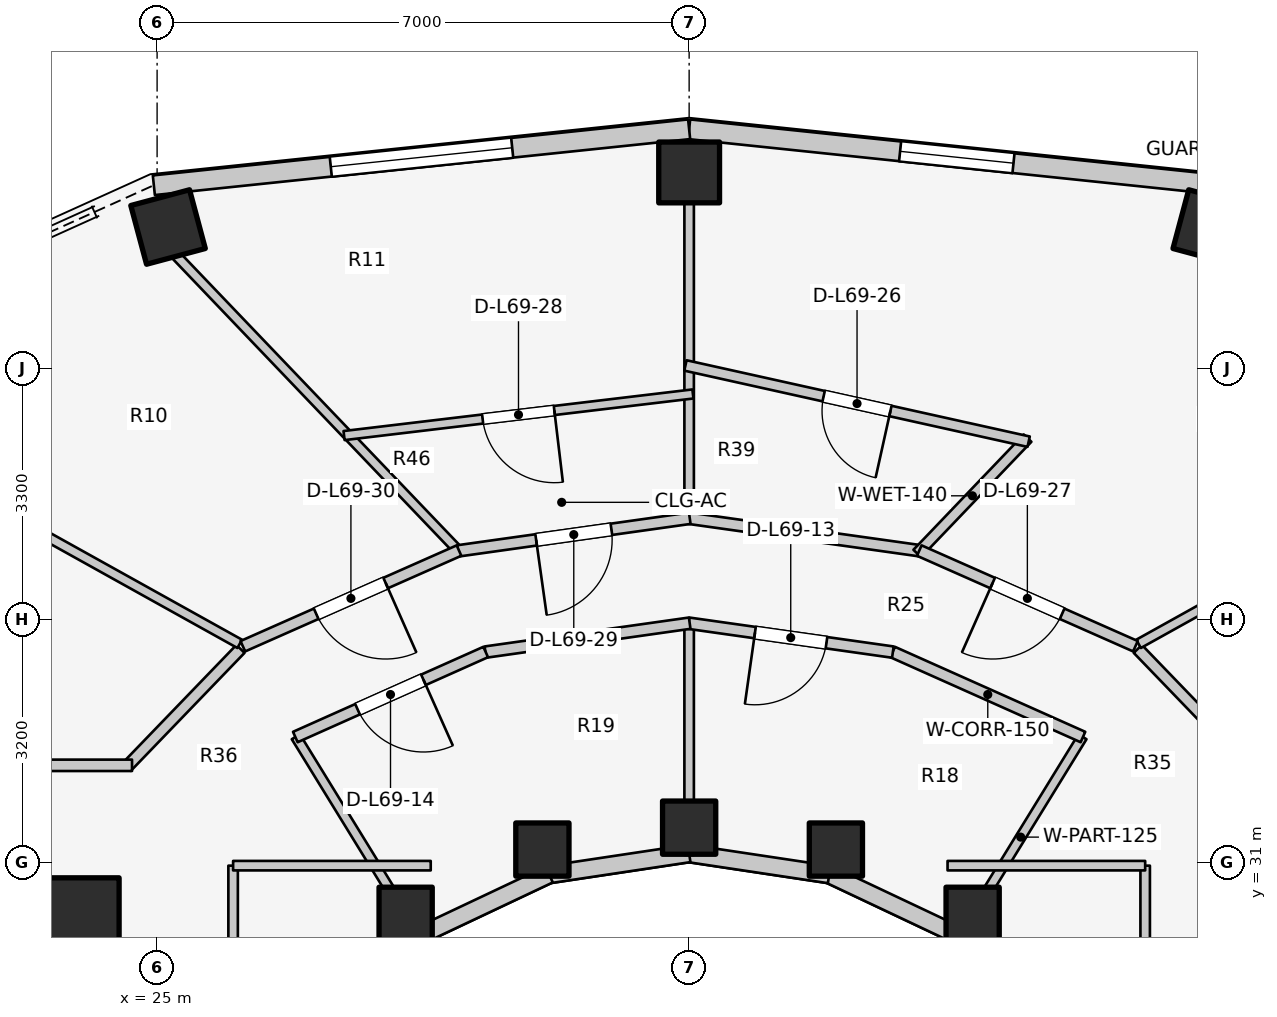
"""IFC4 building model, lengths in metres.
Left out: names, types, materials, properties, quantities, classifications, styles, units other than length and angle.
Written with IfcOpenShell. Run it as: python <this file> out.ifc"""

import sys

from ifc_helpers import new_model, si_unit, direction, frame, frame_2d, origin, origin_2d, place, context, subcontext, project, spatial, rectangle, extrude, element, fill, save


model = new_model("IFC4")
c1 = context("Model", 3, precision=1e-05, world=origin(), true_north=direction((0.0, 1.0)))
c2 = subcontext(c1, "Body", "Model", "MODEL_VIEW")
j1 = project(units=[si_unit("LENGTHUNIT", "METRE"), si_unit("PLANEANGLEUNIT", "RADIAN")], contexts=[c1])
p1 = place(None, origin())
s1 = spatial("IfcSite", under=j1, at=p1, CompositionType="ELEMENT")
p2 = place(p1, origin())
s2 = spatial("IfcBuilding", under=s1, at=p2, CompositionType="ELEMENT")
p3 = place(p2, frame((0.0, 0.0, 226.4)))
s3 = spatial("IfcBuildingStorey", under=s2, at=p3, CompositionType="ELEMENT", Elevation=226.4)
p4 = place(p3, frame((19.65, 30.35, 0.0), z_axis=(0.0, 0.0, 1.0), x_axis=(1.0, 0.0, 0.0)))
e1 = element("IfcWall", 1, at=p4, inside=s3, PredefinedType="SHEAR", context=c2, shape_type="SweptSolid", body=[
    extrude(rectangle(XDim=4.5, YDim=0.55, at=frame_2d((2.25, 0.0))), origin(), (0.0, 0.0, 1.0), 3.1),
])
p5 = place(p3, frame((23.9, 30.2, 0.0), z_axis=(0.0, 0.0, 1.0), x_axis=(1.0, 0.0, 0.0)))
e2 = element("IfcColumn", 2, at=p5, inside=s3, PredefinedType="COLUMN", context=c2, shape_type="SweptSolid", body=[
    extrude(rectangle(XDim=1.2, YDim=1.2, at=origin_2d()), origin(), (0.0, 0.0, 1.0), 3.1),
])
for number, where, z_axis, x_axis in (
    (3, (35.73, 30.327, 0.0), (0.0, 0.0, 1.0), (1.0, 0.0, 0.0)),
    (4, (33.931, 31.172, 0.0), (0.0, 0.0, 1.0), (1.0, 0.0, 0.0)),
):
    element("IfcColumn", number, at=place(p3, frame(where, z_axis=z_axis, x_axis=x_axis)), inside=s3, PredefinedType="COLUMN", context=c2, shape_type="SweptSolid", body=[
        extrude(rectangle(XDim=0.7, YDim=0.7, at=origin_2d()), origin(), (0.0, 0.0, 1.0), 3.1),
    ])
p6 = place(p3, frame((38.856, 39.362, 0.0), z_axis=(0.0, 0.0, 1.0), x_axis=(0.258819045103, 0.965925826289, 0.0)))
e5 = element("IfcColumn", 5, at=p6, inside=s3, PredefinedType="COLUMN", context=c2, shape_type="SweptSolid", body=[
    extrude(rectangle(XDim=0.8, YDim=0.8, at=origin_2d()), origin(), (0.0, 0.0, 1.0), 3.1),
])
p7 = place(p3, frame((32.0, 31.46, 0.0), z_axis=(0.0, 0.0, 1.0), x_axis=(1.0, 0.0, 0.0)))
e6 = element("IfcColumn", 6, at=p7, inside=s3, PredefinedType="COLUMN", context=c2, shape_type="SweptSolid", body=[
    extrude(rectangle(XDim=0.7, YDim=0.7, at=origin_2d()), origin(), (0.0, 0.0, 1.0), 3.1),
])
p8 = place(p3, frame((32.0, 40.08, 0.0), z_axis=(0.0, 0.0, 1.0), x_axis=(0.0, 1.0, 0.0)))
e7 = element("IfcColumn", 7, at=p8, inside=s3, PredefinedType="COLUMN", context=c2, shape_type="SweptSolid", body=[
    extrude(rectangle(XDim=0.8, YDim=0.8, at=origin_2d()), origin(), (0.0, 0.0, 1.0), 3.1),
])
p9 = place(p3, frame((30.069, 31.172, 0.0), z_axis=(0.0, 0.0, 1.0), x_axis=(1.0, 0.0, 0.0)))
e8 = element("IfcColumn", 8, at=p9, inside=s3, PredefinedType="COLUMN", context=c2, shape_type="SweptSolid", body=[
    extrude(rectangle(XDim=0.7, YDim=0.7, at=origin_2d()), origin(), (0.0, 0.0, 1.0), 3.1),
])
p10 = place(p3, frame((25.144, 39.362, 0.0), z_axis=(0.0, 0.0, 1.0), x_axis=(-0.258819045103, 0.965925826289, 0.0)))
e9 = element("IfcColumn", 9, at=p10, inside=s3, PredefinedType="COLUMN", context=c2, shape_type="SweptSolid", body=[
    extrude(rectangle(XDim=0.8, YDim=0.8, at=origin_2d()), origin(), (0.0, 0.0, 1.0), 3.1),
])
p11 = place(p3, frame((28.27, 30.327, 0.0), z_axis=(0.0, 0.0, 1.0), x_axis=(1.0, 0.0, 0.0)))
e10 = element("IfcColumn", 10, at=p11, inside=s3, PredefinedType="COLUMN", context=c2, shape_type="SweptSolid", body=[
    extrude(rectangle(XDim=0.7, YDim=0.7, at=origin_2d()), origin(), (0.0, 0.0, 1.0), 3.1),
])
p12 = place(p3, frame((37.035, 28.742, 0.0), z_axis=(0.0, 0.0, 1.0), x_axis=(-0.752576694707, 0.658504607869, 0.0)))
e11 = element("IfcWall", 11, at=p12, inside=s3, PredefinedType="STANDARD", context=c2, shape_type="SweptSolid", body=[
    extrude(rectangle(XDim=1.959, YDim=0.23, at=frame_2d((0.98, 0.0))), origin(), (0.0, 0.0, 1.0), 2.16),
])
p13 = place(p3, frame((35.56, 30.032, 0.0), z_axis=(0.0, 0.0, 1.0), x_axis=(-0.904179699603, 0.427152280606, 0.0)))
e12 = element("IfcWall", 12, at=p13, inside=s3, PredefinedType="STANDARD", context=c2, shape_type="SweptSolid", body=[
    extrude(rectangle(XDim=1.899, YDim=0.23, at=frame_2d((0.95, 0.0))), origin(), (0.0, 0.0, 1.0), 2.16),
])
for number, where, z_axis, x_axis in (
    (13, (33.843, 30.843, 0.0), (0.0, 0.0, 1.0), (-0.989, 0.149, 0.0)),
    (14, (32.0, 31.12, 0.0), (0.0, 0.0, 1.0), (-0.989, -0.149, 0.0)),
):
    element("IfcWall", number, at=place(p3, frame(where, z_axis=z_axis, x_axis=x_axis)), inside=s3, PredefinedType="STANDARD", context=c2, shape_type="SweptSolid", body=[
        extrude(rectangle(XDim=1.864, YDim=0.23, at=frame_2d((0.932, 0.0))), origin(), (0.0, 0.0, 1.0), 2.16),
    ])
p14 = place(p3, frame((30.157, 30.843, 0.0), z_axis=(0.0, 0.0, 1.0), x_axis=(-0.904179699603, -0.427152280606, 0.0)))
e15 = element("IfcWall", 15, at=p14, inside=s3, PredefinedType="STANDARD", context=c2, shape_type="SweptSolid", body=[
    extrude(rectangle(XDim=1.899, YDim=0.23, at=frame_2d((0.95, 0.0))), origin(), (0.0, 0.0, 1.0), 2.16),
])
p15 = place(p3, frame((28.44, 30.032, 0.0), z_axis=(0.0, 0.0, 1.0), x_axis=(-0.752576694707, -0.658504607869, 0.0)))
e16 = element("IfcWall", 16, at=p15, inside=s3, PredefinedType="STANDARD", context=c2, shape_type="SweptSolid", body=[
    extrude(rectangle(XDim=1.959, YDim=0.23, at=frame_2d((0.98, 0.0))), origin(), (0.0, 0.0, 1.0), 2.16),
])
p16 = place(p3, frame((39.043, 39.912, 0.0), z_axis=(0.0, 0.0, 1.0), x_axis=(-0.994582822721, 0.103947144014, 0.0)))
e17 = element("IfcWall", 17, at=p16, inside=s3, PredefinedType="STANDARD", context=c2, shape_type="SweptSolid", body=[
    extrude(rectangle(XDim=7.081, YDim=0.26, at=frame_2d((3.541, 0.0))), origin(), (0.0, 0.0, 1.0), 2.85),
])
p17 = place(p16, frame((2.791, 0.0, 0.75)))
e18 = element("IfcOpeningElement", 18, at=p17, cuts=e17, PredefinedType="OPENING", context=c2, shape_type="SweptSolid", body=[
    extrude(rectangle(XDim=1.5, YDim=1.6, at=frame_2d((0.75, 0.8))), frame((0.0, 0.14, 0.0), z_axis=(0.0, -1.0, 0.0), x_axis=(1.0, 0.0, 0.0)), (0.0, 0.0, 1.0), 0.28),
])
p18 = place(p3, frame((32.0, 40.648, 0.0), z_axis=(0.0, 0.0, 1.0), x_axis=(-0.994582822721, -0.103947144014, 0.0)))
e19 = element("IfcWall", 19, at=p18, inside=s3, PredefinedType="STANDARD", context=c2, shape_type="SweptSolid", body=[
    extrude(rectangle(XDim=7.081, YDim=0.26, at=frame_2d((3.541, 0.0))), origin(), (0.0, 0.0, 1.0), 2.85),
])
p19 = place(p18, frame((2.341, 0.0, 0.75)))
e20 = element("IfcOpeningElement", 20, at=p19, cuts=e19, PredefinedType="OPENING", context=c2, shape_type="SweptSolid", body=[
    extrude(rectangle(XDim=2.4, YDim=1.7, at=frame_2d((1.2, 0.85))), frame((0.0, 0.14, 0.0), z_axis=(0.0, -1.0, 0.0), x_axis=(1.0, 0.0, 0.0)), (0.0, 0.0, 1.0), 0.28),
])
p20 = place(p3, frame((35.55, 30.015, 0.0), z_axis=(0.0, 0.0, 1.0), x_axis=(0.523992004803, 0.851723182086, 0.0)))
e21 = element("IfcWall", 21, at=p20, inside=s3, PredefinedType="PARTITIONING", context=c2, shape_type="SweptSolid", body=[
    extrude(rectangle(XDim=3.101, YDim=0.125, at=frame_2d((1.551, 0.0))), origin(), (0.0, 0.0, 1.0), 2.376),
])
p21 = place(p3, frame((32.0, 31.1, 0.0), z_axis=(0.0, 0.0, 1.0), x_axis=(0.0, 1.0, 0.0)))
e22 = element("IfcWall", 22, at=p21, inside=s3, PredefinedType="PARTITIONING", context=c2, shape_type="SweptSolid", body=[
    extrude(rectangle(XDim=3.05, YDim=0.125, at=frame_2d((1.525, 0.0))), origin(), (0.0, 0.0, 1.0), 2.376),
])
p22 = place(p3, frame((28.45, 30.015, 0.0), z_axis=(0.0, 0.0, 1.0), x_axis=(-0.523992004803, 0.851723182086, 0.0)))
e23 = element("IfcWall", 23, at=p22, inside=s3, PredefinedType="PARTITIONING", context=c2, shape_type="SweptSolid", body=[
    extrude(rectangle(XDim=3.101, YDim=0.125, at=frame_2d((1.551, 0.0))), origin(), (0.0, 0.0, 1.0), 2.376),
])
p23 = place(p3, frame((37.181, 32.652, 0.0), z_axis=(0.0, 0.0, 1.0), x_axis=(-0.913120130558, 0.407690602257, 0.0)))
e24 = element("IfcWall", 24, at=p23, inside=s3, PredefinedType="PARTITIONING", context=c2, shape_type="SweptSolid", body=[
    extrude(rectangle(XDim=2.743, YDim=0.15, at=frame_2d((1.371, 0.0))), origin(), (0.0, 0.0, 1.0), 2.376),
])
p24 = place(p3, frame((34.68, 33.77, 0.0), z_axis=(0.0, 0.0, 1.0), x_axis=(-0.990132151456, 0.140136799779, 0.0)))
e25 = element("IfcWall", 25, at=p24, inside=s3, PredefinedType="PARTITIONING", context=c2, shape_type="SweptSolid", body=[
    extrude(rectangle(XDim=2.714, YDim=0.15, at=frame_2d((1.357, 0.0))), origin(), (0.0, 0.0, 1.0), 2.376),
])
p25 = place(p24, frame((0.882, 0.0, 0.0)))
e26 = element("IfcOpeningElement", 26, at=p25, cuts=e25, PredefinedType="OPENING", context=c2, shape_type="SweptSolid", body=[
    extrude(rectangle(XDim=0.95, YDim=2.1, at=frame_2d((0.475, 1.05))), frame((0.0, 0.085, 0.0), z_axis=(0.0, -1.0, 0.0), x_axis=(1.0, 0.0, 0.0)), (0.0, 0.0, 1.0), 0.17),
])
p26 = place(p3, frame((32.007, 34.15, 0.0), z_axis=(0.0, 0.0, 1.0), x_axis=(-0.990132151456, -0.140136799779, 0.0)))
e27 = element("IfcWall", 27, at=p26, inside=s3, PredefinedType="PARTITIONING", context=c2, shape_type="SweptSolid", body=[
    extrude(rectangle(XDim=2.714, YDim=0.15, at=frame_2d((1.357, 0.0))), origin(), (0.0, 0.0, 1.0), 2.376),
])
p27 = place(p3, frame((29.323, 33.771, 0.0), z_axis=(0.0, 0.0, 1.0), x_axis=(-0.913120130558, -0.407690602257, 0.0)))
e28 = element("IfcWall", 28, at=p27, inside=s3, PredefinedType="PARTITIONING", context=c2, shape_type="SweptSolid", body=[
    extrude(rectangle(XDim=2.743, YDim=0.15, at=frame_2d((1.371, 0.0))), origin(), (0.0, 0.0, 1.0), 2.376),
])
p28 = place(p27, frame((0.896, 0.0, 0.0)))
e29 = element("IfcOpeningElement", 29, at=p28, cuts=e28, PredefinedType="OPENING", context=c2, shape_type="SweptSolid", body=[
    extrude(rectangle(XDim=0.95, YDim=2.1, at=frame_2d((0.475, 1.05))), frame((0.0, 0.085, 0.0), z_axis=(0.0, -1.0, 0.0), x_axis=(1.0, 0.0, 0.0)), (0.0, 0.0, 1.0), 0.17),
])
p29 = place(p3, frame((26.0, 25.8, 0.0), z_axis=(0.0, 0.0, 1.0), x_axis=(0.0, 1.0, 0.0)))
e30 = element("IfcWall", 30, at=p29, inside=s3, PredefinedType="PARTITIONING", context=c2, shape_type="SweptSolid", body=[
    extrude(rectangle(XDim=5.16, YDim=0.125, at=frame_2d((2.58, 0.0))), origin(), (0.0, 0.0, 1.0), 2.232),
])
p30 = place(p3, frame((26.0, 30.96, 0.0), z_axis=(0.0, 0.0, 1.0), x_axis=(1.0, 0.0, 0.0)))
e31 = element("IfcWall", 31, at=p30, inside=s3, PredefinedType="PARTITIONING", context=c2, shape_type="SweptSolid", body=[
    extrude(rectangle(XDim=2.6, YDim=0.125, at=frame_2d((1.3, 0.0))), origin(), (0.0, 0.0, 1.0), 2.376),
])
p31 = place(p3, frame((38.0, 25.8, 0.0), z_axis=(0.0, 0.0, 1.0), x_axis=(0.0, 1.0, 0.0)))
e32 = element("IfcWall", 32, at=p31, inside=s3, PredefinedType="PARTITIONING", context=c2, shape_type="SweptSolid", body=[
    extrude(rectangle(XDim=5.16, YDim=0.125, at=frame_2d((2.58, 0.0))), origin(), (0.0, 0.0, 1.0), 2.232),
])
p32 = place(p3, frame((35.4, 30.96, 0.0), z_axis=(0.0, 0.0, 1.0), x_axis=(1.0, 0.0, 0.0)))
e33 = element("IfcWall", 33, at=p32, inside=s3, PredefinedType="PARTITIONING", context=c2, shape_type="SweptSolid", body=[
    extrude(rectangle(XDim=2.6, YDim=0.125, at=frame_2d((1.3, 0.0))), origin(), (0.0, 0.0, 1.0), 2.376),
])
for number, where, z_axis, x_axis in (
    (34, (37.903, 33.812, 0.0), (0.0, 0.0, 1.0), (0.694, -0.72, 0.0)),
    (35, (26.097, 33.812, 0.0), (0.0, 0.0, 1.0), (-0.694, -0.72, 0.0)),
):
    element("IfcWall", number, at=place(p3, frame(where, z_axis=z_axis, x_axis=x_axis)), inside=s3, PredefinedType="PARTITIONING", context=c2, shape_type="SweptSolid", body=[
        extrude(rectangle(XDim=2.158, YDim=0.15, at=frame_2d((1.079, 0.0))), origin(), (0.0, 0.0, 1.0), 2.376),
    ])
p33 = place(p3, frame((17.15, 32.28, 0.0), z_axis=(0.0, 0.0, 1.0), x_axis=(1.0, 0.0, 0.0)))
e36 = element("IfcWall", 36, at=p33, inside=s3, PredefinedType="PARTITIONING", context=c2, shape_type="SweptSolid", body=[
    extrude(rectangle(XDim=7.52, YDim=0.15, at=frame_2d((3.76, 0.0))), origin(), (0.0, 0.0, 1.0), 2.376),
])
p34 = place(p33, frame((1.3, 0.0, 0.0)))
e37 = element("IfcOpeningElement", 37, at=p34, cuts=e36, PredefinedType="OPENING", context=c2, shape_type="SweptSolid", body=[
    extrude(rectangle(XDim=0.9, YDim=2.1, at=frame_2d((0.45, 1.05))), frame((0.0, 0.085, 0.0), z_axis=(0.0, -1.0, 0.0), x_axis=(1.0, 0.0, 0.0)), (0.0, 0.0, 1.0), 0.17),
])
p35 = place(p3, frame((37.913, 33.878, 0.0), z_axis=(0.0, 0.0, 1.0), x_axis=(0.87377679808, 0.486327160599, 0.0)))
e38 = element("IfcWall", 38, at=p35, inside=s3, PredefinedType="PARTITIONING", context=c2, shape_type="SweptSolid", body=[
    extrude(rectangle(XDim=6.24, YDim=0.125, at=frame_2d((3.12, 0.0))), origin(), (0.0, 0.0, 1.0), 2.376),
])
p36 = place(p3, frame((32.0, 35.585, 0.0), z_axis=(0.0, 0.0, 1.0), x_axis=(0.0, 1.0, 0.0)))
e39 = element("IfcWall", 39, at=p36, inside=s3, PredefinedType="PARTITIONING", context=c2, shape_type="SweptSolid", body=[
    extrude(rectangle(XDim=4.115, YDim=0.125, at=frame_2d((2.058, 0.0))), origin(), (0.0, 0.0, 1.0), 2.376),
])
p37 = place(p3, frame((28.926, 35.143, 0.0), z_axis=(0.0, 0.0, 1.0), x_axis=(-0.691128003726, 0.722732372642, 0.0)))
e40 = element("IfcWall", 40, at=p37, inside=s3, PredefinedType="PARTITIONING", context=c2, shape_type="SweptSolid", body=[
    extrude(rectangle(XDim=5.33, YDim=0.125, at=frame_2d((2.665, 0.0))), origin(), (0.0, 0.0, 1.0), 2.376),
])
p38 = place(p3, frame((26.087, 33.878, 0.0), z_axis=(0.0, 0.0, 1.0), x_axis=(-0.87377679808, 0.486327160599, 0.0)))
e41 = element("IfcWall", 41, at=p38, inside=s3, PredefinedType="PARTITIONING", context=c2, shape_type="SweptSolid", body=[
    extrude(rectangle(XDim=6.24, YDim=0.125, at=frame_2d((3.12, 0.0))), origin(), (0.0, 0.0, 1.0), 2.376),
])
p39 = place(p3, frame((35.085, 35.096, 0.0), z_axis=(0.0, 0.0, 1.0), x_axis=(-0.990254086283, 0.139272555084, 0.0)))
e42 = element("IfcWall", 42, at=p39, inside=s3, PredefinedType="PARTITIONING", context=c2, shape_type="SweptSolid", body=[
    extrude(rectangle(XDim=3.166, YDim=0.15, at=frame_2d((1.583, 0.0))), origin(), (0.0, 0.0, 1.0), 2.376),
])
p40 = place(p3, frame((35.001, 35.067, 0.0), z_axis=(0.0, 0.0, 1.0), x_axis=(0.691180416361, 0.722682248321, 0.0)))
e43 = element("IfcWall", 43, at=p40, inside=s3, PredefinedType="PLUMBINGWALL", context=c2, shape_type="SweptSolid", body=[
    extrude(rectangle(XDim=2.1, YDim=0.14, at=frame_2d((1.05, 0.0))), origin(), (0.0, 0.0, 1.0), 2.385),
])
p41 = place(p3, frame((36.467, 36.538, 0.0), z_axis=(0.0, 0.0, 1.0), x_axis=(-0.976214372251, 0.21680751696, 0.0)))
e44 = element("IfcWall", 44, at=p41, inside=s3, PredefinedType="PLUMBINGWALL", context=c2, shape_type="SweptSolid", body=[
    extrude(rectangle(XDim=4.626, YDim=0.14, at=frame_2d((2.313, 0.0))), origin(), (0.0, 0.0, 1.0), 2.376),
])
p42 = place(p41, frame((1.863, 0.0, 0.0)))
e45 = element("IfcOpeningElement", 45, at=p42, cuts=e44, PredefinedType="OPENING", context=c2, shape_type="SweptSolid", body=[
    extrude(rectangle(XDim=0.9, YDim=2.1, at=frame_2d((0.45, 1.05))), frame((0.0, 0.08, 0.0), z_axis=(0.0, -1.0, 0.0), x_axis=(1.0, 0.0, 0.0)), (0.0, 0.0, 1.0), 0.16),
])
p43 = place(p3, frame((37.872, 33.847, 0.0), z_axis=(0.0, 0.0, 1.0), x_axis=(-0.914490094652, 0.40460828808, 0.0)))
e46 = element("IfcWall", 46, at=p43, inside=s3, PredefinedType="PARTITIONING", context=c2, shape_type="SweptSolid", body=[
    extrude(rectangle(XDim=3.11, YDim=0.15, at=frame_2d((1.555, 0.0))), origin(), (0.0, 0.0, 1.0), 2.376),
])
p44 = place(p43, frame((1.055, 0.0, 0.0)))
e47 = element("IfcOpeningElement", 47, at=p44, cuts=e46, PredefinedType="OPENING", context=c2, shape_type="SweptSolid", body=[
    extrude(rectangle(XDim=1.0, YDim=2.1, at=frame_2d((0.5, 1.05))), frame((0.0, 0.085, 0.0), z_axis=(0.0, -1.0, 0.0), x_axis=(1.0, 0.0, 0.0)), (0.0, 0.0, 1.0), 0.17),
])
p45 = place(p3, frame((32.05, 37.166, 0.0), z_axis=(0.0, 0.0, 1.0), x_axis=(-0.992963303559, -0.118422454736, 0.0)))
e48 = element("IfcWall", 48, at=p45, inside=s3, PredefinedType="MOVABLE", context=c2, shape_type="SweptSolid", body=[
    extrude(rectangle(XDim=4.622, YDim=0.12, at=frame_2d((2.311, 0.0))), origin(), (0.0, 0.0, 1.0), 2.376),
])
p46 = place(p45, frame((1.836, 0.0, 0.0)))
e49 = element("IfcOpeningElement", 49, at=p46, cuts=e48, PredefinedType="OPENING", context=c2, shape_type="SweptSolid", body=[
    extrude(rectangle(XDim=0.95, YDim=2.1, at=frame_2d((0.475, 1.05))), frame((0.0, 0.07, 0.0), z_axis=(0.0, -1.0, 0.0), x_axis=(1.0, 0.0, 0.0)), (0.0, 0.0, 1.0), 0.14),
])
p47 = place(p3, frame((32.008, 35.53, 0.0), z_axis=(0.0, 0.0, 1.0), x_axis=(-0.990257602807, -0.139247549651, 0.0)))
e50 = element("IfcWall", 50, at=p47, inside=s3, PredefinedType="PARTITIONING", context=c2, shape_type="SweptSolid", body=[
    extrude(rectangle(XDim=3.082, YDim=0.15, at=frame_2d((1.541, 0.0))), origin(), (0.0, 0.0, 1.0), 2.376),
])
p48 = place(p47, frame((1.041, 0.0, 0.0)))
e51 = element("IfcOpeningElement", 51, at=p48, cuts=e50, PredefinedType="OPENING", context=c2, shape_type="SweptSolid", body=[
    extrude(rectangle(XDim=1.0, YDim=2.1, at=frame_2d((0.5, 1.05))), frame((0.0, 0.085, 0.0), z_axis=(0.0, -1.0, 0.0), x_axis=(1.0, 0.0, 0.0)), (0.0, 0.0, 1.0), 0.17),
])
p49 = place(p3, frame((28.972, 35.105, 0.0), z_axis=(0.0, 0.0, 1.0), x_axis=(-0.914490094652, -0.40460828808, 0.0)))
e52 = element("IfcWall", 52, at=p49, inside=s3, PredefinedType="PARTITIONING", context=c2, shape_type="SweptSolid", body=[
    extrude(rectangle(XDim=3.11, YDim=0.15, at=frame_2d((1.555, 0.0))), origin(), (0.0, 0.0, 1.0), 2.376),
])
p50 = place(p49, frame((1.055, 0.0, 0.0)))
e53 = element("IfcOpeningElement", 53, at=p50, cuts=e52, PredefinedType="OPENING", context=c2, shape_type="SweptSolid", body=[
    extrude(rectangle(XDim=1.0, YDim=2.1, at=frame_2d((0.5, 1.05))), frame((0.0, 0.085, 0.0), z_axis=(0.0, -1.0, 0.0), x_axis=(1.0, 0.0, 0.0)), (0.0, 0.0, 1.0), 0.17),
])
p51 = place(p17, origin())
e54 = element("IfcWindow", 54, at=p51, inside=s3, PartitioningType="SINGLE_PANEL", PredefinedType="WINDOW", context=c2, shape_type="SweptSolid", body=[
    extrude(rectangle(XDim=1.5, YDim=1.6, at=frame_2d((0.75, 0.8))), frame((0.0, 0.03, 0.0), z_axis=(0.0, -1.0, 0.0), x_axis=(1.0, 0.0, 0.0)), (0.0, 0.0, 1.0), 0.06),
])
fill(e18, e54)
p52 = place(p19, origin())
e55 = element("IfcWindow", 55, at=p52, inside=s3, PartitioningType="SINGLE_PANEL", PredefinedType="WINDOW", context=c2, shape_type="SweptSolid", body=[
    extrude(rectangle(XDim=2.4, YDim=1.7, at=frame_2d((1.2, 0.85))), frame((0.0, 0.03, 0.0), z_axis=(0.0, -1.0, 0.0), x_axis=(1.0, 0.0, 0.0)), (0.0, 0.0, 1.0), 0.06),
])
fill(e20, e55)
p53 = place(p25, origin())
e56 = element("IfcDoor", 56, at=p53, inside=s3, OperationType="SINGLE_SWING_RIGHT", PredefinedType="DOOR", context=c2, shape_type="SweptSolid", body=[
    extrude(rectangle(XDim=0.95, YDim=2.1, at=frame_2d((0.475, 1.05))), frame((0.0, 0.025, 0.0), z_axis=(0.0, -1.0, 0.0), x_axis=(1.0, 0.0, 0.0)), (0.0, 0.0, 1.0), 0.05),
])
fill(e26, e56)
p54 = place(p28, origin())
e57 = element("IfcDoor", 57, at=p54, inside=s3, OperationType="SINGLE_SWING_LEFT", PredefinedType="DOOR", context=c2, shape_type="SweptSolid", body=[
    extrude(rectangle(XDim=0.95, YDim=2.1, at=frame_2d((0.475, 1.05))), frame((0.0, 0.025, 0.0), z_axis=(0.0, -1.0, 0.0), x_axis=(1.0, 0.0, 0.0)), (0.0, 0.0, 1.0), 0.05),
])
fill(e29, e57)
p55 = place(p42, origin())
e58 = element("IfcDoor", 58, at=p55, inside=s3, OperationType="SINGLE_SWING_LEFT", PredefinedType="DOOR", context=c2, shape_type="SweptSolid", body=[
    extrude(rectangle(XDim=0.9, YDim=2.1, at=frame_2d((0.45, 1.05))), frame((0.0, 0.025, 0.0), z_axis=(0.0, -1.0, 0.0), x_axis=(1.0, 0.0, 0.0)), (0.0, 0.0, 1.0), 0.05),
])
fill(e45, e58)
p56 = place(p44, origin())
e59 = element("IfcDoor", 59, at=p56, inside=s3, OperationType="SINGLE_SWING_RIGHT", PredefinedType="DOOR", context=c2, shape_type="SweptSolid", body=[
    extrude(rectangle(XDim=1.0, YDim=2.1, at=frame_2d((0.5, 1.05))), frame((0.0, 0.025, 0.0), z_axis=(0.0, -1.0, 0.0), x_axis=(1.0, 0.0, 0.0)), (0.0, 0.0, 1.0), 0.05),
])
fill(e47, e59)
p57 = place(p46, origin())
e60 = element("IfcDoor", 60, at=p57, inside=s3, OperationType="SINGLE_SWING_LEFT", PredefinedType="DOOR", context=c2, shape_type="SweptSolid", body=[
    extrude(rectangle(XDim=0.95, YDim=2.1, at=frame_2d((0.475, 1.05))), frame((0.0, 0.025, 0.0), z_axis=(0.0, -1.0, 0.0), x_axis=(1.0, 0.0, 0.0)), (0.0, 0.0, 1.0), 0.05),
])
fill(e49, e60)
p58 = place(p48, origin())
e61 = element("IfcDoor", 61, at=p58, inside=s3, OperationType="SINGLE_SWING_RIGHT", PredefinedType="DOOR", context=c2, shape_type="SweptSolid", body=[
    extrude(rectangle(XDim=1.0, YDim=2.1, at=frame_2d((0.5, 1.05))), frame((0.0, 0.025, 0.0), z_axis=(0.0, -1.0, 0.0), x_axis=(1.0, 0.0, 0.0)), (0.0, 0.0, 1.0), 0.05),
])
fill(e51, e61)
p59 = place(p50, origin())
e62 = element("IfcDoor", 62, at=p59, inside=s3, OperationType="SINGLE_SWING_LEFT", PredefinedType="DOOR", context=c2, shape_type="SweptSolid", body=[
    extrude(rectangle(XDim=1.0, YDim=2.1, at=frame_2d((0.5, 1.05))), frame((0.0, 0.025, 0.0), z_axis=(0.0, -1.0, 0.0), x_axis=(1.0, 0.0, 0.0)), (0.0, 0.0, 1.0), 0.05),
])
fill(e53, e62)
save(model, sys.argv[1])
